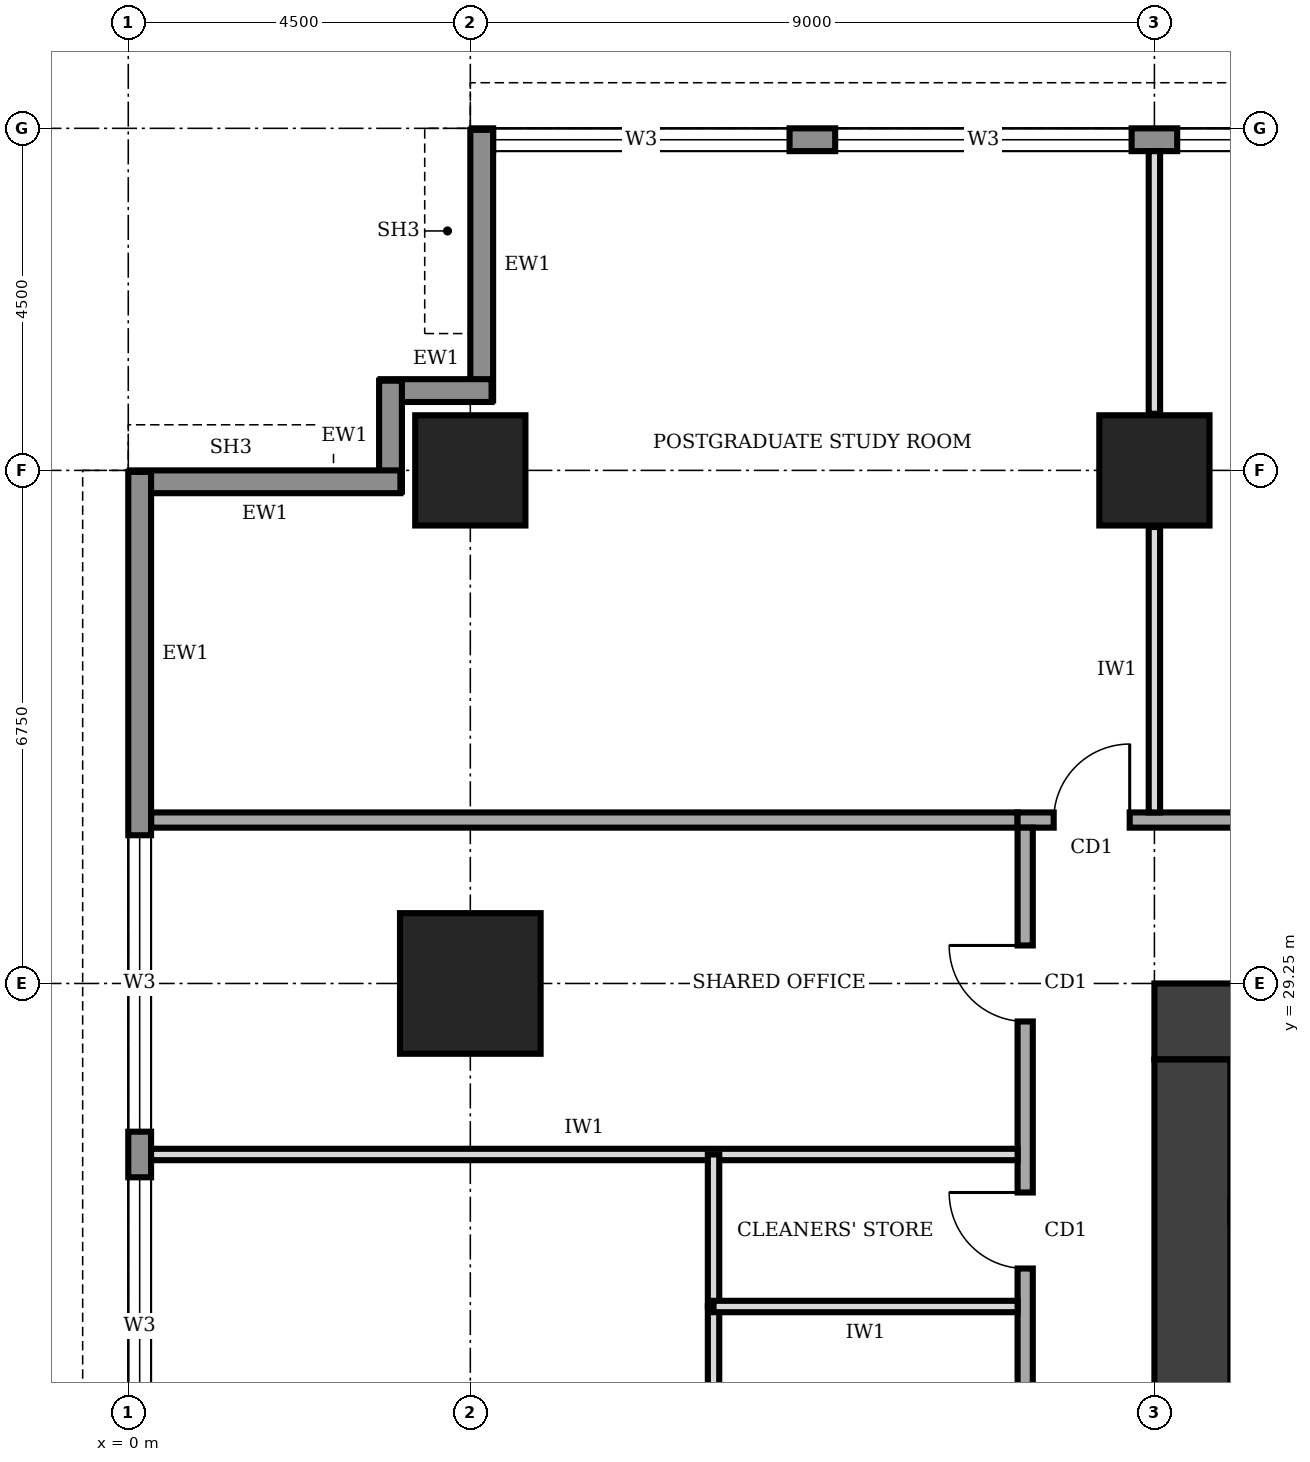
"""IFC4 building model, lengths in metres.
Left out: names, types, materials, properties, quantities, classifications, styles, units other than length and angle.
Written with IfcOpenShell. Run it as: python <this file> out.ifc"""

import sys

from ifc_helpers import new_model, si_unit, direction, frame, frame_2d, origin, origin_2d, place, context, subcontext, project, spatial, rectangle, extrude, element, fill, save


model = new_model("IFC4")
c1 = context("Model", 3, precision=1e-05, world=origin(), true_north=direction((0.0, 1.0)))
c2 = subcontext(c1, "Body", "Model", "MODEL_VIEW")
j1 = project(units=[si_unit("LENGTHUNIT", "METRE"), si_unit("PLANEANGLEUNIT", "RADIAN")], contexts=[c1])
p1 = place(None, origin())
s1 = spatial("IfcSite", under=j1, at=p1, CompositionType="ELEMENT")
p2 = place(p1, origin())
s2 = spatial("IfcBuilding", under=s1, at=p2, CompositionType="ELEMENT")
p3 = place(p2, frame((0.0, 0.0, 253.0)))
s3 = spatial("IfcBuildingStorey", under=s2, at=p3, CompositionType="ELEMENT", Elevation=253.0)
p4 = place(p3, frame((27.0, 28.75, 0.0), z_axis=(0.0, 0.0, 1.0), x_axis=(-1.0, 0.0, 0.0)))
e1 = element("IfcWall", 1, at=p4, inside=s3, PredefinedType="SHEAR", context=c2, shape_type="SweptSolid", body=[
    extrude(rectangle(XDim=13.5, YDim=1.0, at=frame_2d((6.75, 0.0))), origin(), (0.0, 0.0, 1.0), 4.0),
])
p5 = place(p4, frame((4.75, 0.0, 0.0)))
e2 = element("IfcOpeningElement", 2, at=p5, cuts=e1, PredefinedType="OPENING", context=c2, shape_type="SweptSolid", body=[
    extrude(rectangle(XDim=1.8, YDim=2.1, at=frame_2d((0.9, 1.05))), frame((0.0, 0.51, 0.0), z_axis=(0.0, -1.0, 0.0), x_axis=(1.0, 0.0, 0.0)), (0.0, 0.0, 1.0), 1.02),
])
p6 = place(p3, frame((14.0, 28.25, 0.0), z_axis=(0.0, 0.0, 1.0), x_axis=(0.0, -1.0, 0.0)))
e3 = element("IfcWall", 3, at=p6, inside=s3, PredefinedType="SHEAR", context=c2, shape_type="SweptSolid", body=[
    extrude(rectangle(XDim=16.0, YDim=1.0, at=frame_2d((8.0, 0.0))), origin(), (0.0, 0.0, 1.0), 4.0),
])
p7 = place(p3, frame((4.5, 29.25, 0.0), z_axis=(0.0, 0.0, 1.0), x_axis=(1.0, 0.0, 0.0)))
e4 = element("IfcColumn", 4, at=p7, inside=s3, PredefinedType="COLUMN", context=c2, shape_type="SweptSolid", body=[
    extrude(rectangle(XDim=1.85, YDim=1.85, at=origin_2d()), origin(), (0.0, 0.0, 1.0), 4.0),
])
for number, where, z_axis, x_axis in (
    (5, (4.5, 36.0, 0.0), (0.0, 0.0, 1.0), (1.0, 0.0, 0.0)),
    (6, (13.5, 36.0, 0.0), (0.0, 0.0, 1.0), (1.0, 0.0, 0.0)),
):
    element("IfcColumn", number, at=place(p3, frame(where, z_axis=z_axis, x_axis=x_axis)), inside=s3, PredefinedType="COLUMN", context=c2, shape_type="SweptSolid", body=[
        extrude(rectangle(XDim=1.45, YDim=1.45, at=origin_2d()), origin(), (0.0, 0.0, 1.0), 4.0),
    ])
p8 = place(p3, frame((35.98, 40.35, 0.0), z_axis=(0.0, 0.0, 1.0), x_axis=(-1.0, 0.0, 0.0)))
e7 = element("IfcWall", 7, at=p8, inside=s3, PredefinedType="STANDARD", context=c2, shape_type="SweptSolid", body=[
    extrude(rectangle(XDim=31.46, YDim=0.3, at=frame_2d((15.73, 0.0))), origin(), (0.0, 0.0, 1.0), 3.75),
])
p9 = place(p8, frame((27.28, 0.0, 0.95)))
e8 = element("IfcOpeningElement", 8, at=p9, cuts=e7, PredefinedType="OPENING", context=c2, shape_type="SweptSolid", body=[
    extrude(rectangle(XDim=3.9, YDim=1.8, at=frame_2d((1.95, 0.9))), frame((0.0, 0.16, 0.0), z_axis=(0.0, -1.0, 0.0), x_axis=(1.0, 0.0, 0.0)), (0.0, 0.0, 1.0), 0.32),
])
p10 = place(p8, frame((22.78, 0.0, 0.95)))
e9 = element("IfcOpeningElement", 9, at=p10, cuts=e7, PredefinedType="OPENING", context=c2, shape_type="SweptSolid", body=[
    extrude(rectangle(XDim=3.9, YDim=1.8, at=frame_2d((1.95, 0.9))), frame((0.0, 0.16, 0.0), z_axis=(0.0, -1.0, 0.0), x_axis=(1.0, 0.0, 0.0)), (0.0, 0.0, 1.0), 0.32),
])
p11 = place(p8, frame((18.28, 0.0, 0.95)))
e10 = element("IfcOpeningElement", 10, at=p11, cuts=e7, PredefinedType="OPENING", context=c2, shape_type="SweptSolid", body=[
    extrude(rectangle(XDim=3.9, YDim=1.8, at=frame_2d((1.95, 0.9))), frame((0.0, 0.16, 0.0), z_axis=(0.0, -1.0, 0.0), x_axis=(1.0, 0.0, 0.0)), (0.0, 0.0, 1.0), 0.32),
])
p12 = place(p8, frame((13.78, 0.0, 0.95)))
e11 = element("IfcOpeningElement", 11, at=p12, cuts=e7, PredefinedType="OPENING", context=c2, shape_type="SweptSolid", body=[
    extrude(rectangle(XDim=3.9, YDim=1.8, at=frame_2d((1.95, 0.9))), frame((0.0, 0.16, 0.0), z_axis=(0.0, -1.0, 0.0), x_axis=(1.0, 0.0, 0.0)), (0.0, 0.0, 1.0), 0.32),
])
p13 = place(p8, frame((9.28, 0.0, 0.95)))
e12 = element("IfcOpeningElement", 12, at=p13, cuts=e7, PredefinedType="OPENING", context=c2, shape_type="SweptSolid", body=[
    extrude(rectangle(XDim=3.9, YDim=1.8, at=frame_2d((1.95, 0.9))), frame((0.0, 0.16, 0.0), z_axis=(0.0, -1.0, 0.0), x_axis=(1.0, 0.0, 0.0)), (0.0, 0.0, 1.0), 0.32),
])
p14 = place(p8, frame((4.78, 0.0, 0.95)))
e13 = element("IfcOpeningElement", 13, at=p14, cuts=e7, PredefinedType="OPENING", context=c2, shape_type="SweptSolid", body=[
    extrude(rectangle(XDim=3.9, YDim=1.8, at=frame_2d((1.95, 0.9))), frame((0.0, 0.16, 0.0), z_axis=(0.0, -1.0, 0.0), x_axis=(1.0, 0.0, 0.0)), (0.0, 0.0, 1.0), 0.32),
])
p15 = place(p3, frame((4.65, 40.48, 0.0), z_axis=(0.0, 0.0, 1.0), x_axis=(0.0, -1.0, 0.0)))
e14 = element("IfcWall", 14, at=p15, inside=s3, PredefinedType="STANDARD", context=c2, shape_type="SweptSolid", body=[
    extrude(rectangle(XDim=3.56, YDim=0.3, at=frame_2d((1.78, 0.0))), origin(), (0.0, 0.0, 1.0), 2.85),
])
for number, where, z_axis, x_axis in (
    (15, (4.78, 37.05, 0.0), (0.0, 0.0, 1.0), (-1.0, 0.0, 0.0)),
    (16, (3.45, 37.18, 0.0), (0.0, 0.0, 1.0), (0.0, -1.0, 0.0)),
):
    element("IfcWall", number, at=place(p3, frame(where, z_axis=z_axis, x_axis=x_axis)), inside=s3, PredefinedType="STANDARD", context=c2, shape_type="SweptSolid", body=[
        extrude(rectangle(XDim=1.46, YDim=0.3, at=frame_2d((0.73, 0.0))), origin(), (0.0, 0.0, 1.0), 3.75),
    ])
p16 = place(p3, frame((3.58, 35.85, 0.0), z_axis=(0.0, 0.0, 1.0), x_axis=(-1.0, 0.0, 0.0)))
e17 = element("IfcWall", 17, at=p16, inside=s3, PredefinedType="STANDARD", context=c2, shape_type="SweptSolid", body=[
    extrude(rectangle(XDim=3.56, YDim=0.3, at=frame_2d((1.78, 0.0))), origin(), (0.0, 0.0, 1.0), 2.85),
])
p17 = place(p3, frame((0.15, 35.98, 0.0), z_axis=(0.0, 0.0, 1.0), x_axis=(0.0, -1.0, 0.0)))
e18 = element("IfcWall", 18, at=p17, inside=s3, PredefinedType="STANDARD", context=c2, shape_type="SweptSolid", body=[
    extrude(rectangle(XDim=31.46, YDim=0.3, at=frame_2d((15.73, 0.0))), origin(), (0.0, 0.0, 1.0), 3.75),
])
p18 = place(p17, frame((27.28, 0.0, 0.95)))
e19 = element("IfcOpeningElement", 19, at=p18, cuts=e18, PredefinedType="OPENING", context=c2, shape_type="SweptSolid", body=[
    extrude(rectangle(XDim=3.9, YDim=1.8, at=frame_2d((1.95, 0.9))), frame((0.0, 0.16, 0.0), z_axis=(0.0, -1.0, 0.0), x_axis=(1.0, 0.0, 0.0)), (0.0, 0.0, 1.0), 0.32),
])
p19 = place(p17, frame((22.78, 0.0, 0.95)))
e20 = element("IfcOpeningElement", 20, at=p19, cuts=e18, PredefinedType="OPENING", context=c2, shape_type="SweptSolid", body=[
    extrude(rectangle(XDim=3.9, YDim=1.8, at=frame_2d((1.95, 0.9))), frame((0.0, 0.16, 0.0), z_axis=(0.0, -1.0, 0.0), x_axis=(1.0, 0.0, 0.0)), (0.0, 0.0, 1.0), 0.32),
])
p20 = place(p17, frame((18.28, 0.0, 0.95)))
e21 = element("IfcOpeningElement", 21, at=p20, cuts=e18, PredefinedType="OPENING", context=c2, shape_type="SweptSolid", body=[
    extrude(rectangle(XDim=3.9, YDim=1.8, at=frame_2d((1.95, 0.9))), frame((0.0, 0.16, 0.0), z_axis=(0.0, -1.0, 0.0), x_axis=(1.0, 0.0, 0.0)), (0.0, 0.0, 1.0), 0.32),
])
p21 = place(p17, frame((13.78, 0.0, 0.95)))
e22 = element("IfcOpeningElement", 22, at=p21, cuts=e18, PredefinedType="OPENING", context=c2, shape_type="SweptSolid", body=[
    extrude(rectangle(XDim=3.9, YDim=1.8, at=frame_2d((1.95, 0.9))), frame((0.0, 0.16, 0.0), z_axis=(0.0, -1.0, 0.0), x_axis=(1.0, 0.0, 0.0)), (0.0, 0.0, 1.0), 0.32),
])
p22 = place(p17, frame((9.28, 0.0, 0.95)))
e23 = element("IfcOpeningElement", 23, at=p22, cuts=e18, PredefinedType="OPENING", context=c2, shape_type="SweptSolid", body=[
    extrude(rectangle(XDim=3.9, YDim=1.8, at=frame_2d((1.95, 0.9))), frame((0.0, 0.16, 0.0), z_axis=(0.0, -1.0, 0.0), x_axis=(1.0, 0.0, 0.0)), (0.0, 0.0, 1.0), 0.32),
])
p23 = place(p17, frame((4.78, 0.0, 0.95)))
e24 = element("IfcOpeningElement", 24, at=p23, cuts=e18, PredefinedType="OPENING", context=c2, shape_type="SweptSolid", body=[
    extrude(rectangle(XDim=3.9, YDim=1.8, at=frame_2d((1.95, 0.9))), frame((0.0, 0.16, 0.0), z_axis=(0.0, -1.0, 0.0), x_axis=(1.0, 0.0, 0.0)), (0.0, 0.0, 1.0), 0.32),
])
p24 = place(p3, frame((28.6, 31.4, 0.0), z_axis=(0.0, 0.0, 1.0), x_axis=(-1.0, 0.0, 0.0)))
e25 = element("IfcWall", 25, at=p24, inside=s3, PredefinedType="SOLIDWALL", context=c2, shape_type="SweptSolid", body=[
    extrude(rectangle(XDim=16.9, YDim=0.2, at=frame_2d((8.45, 0.0))), origin(), (0.0, 0.0, 1.0), 3.75),
])
p25 = place(p24, frame((15.425, 0.0, 0.0)))
e26 = element("IfcOpeningElement", 26, at=p25, cuts=e25, PredefinedType="OPENING", context=c2, shape_type="SweptSolid", body=[
    extrude(rectangle(XDim=1.0, YDim=2.1, at=frame_2d((0.5, 1.05))), frame((0.0, 0.11, 0.0), z_axis=(0.0, -1.0, 0.0), x_axis=(1.0, 0.0, 0.0)), (0.0, 0.0, 1.0), 0.22),
])
p26 = place(p24, frame((10.1, 0.0, 0.0)))
e27 = element("IfcOpeningElement", 27, at=p26, cuts=e25, PredefinedType="OPENING", context=c2, shape_type="SweptSolid", body=[
    extrude(rectangle(XDim=1.0, YDim=2.1, at=frame_2d((0.5, 1.05))), frame((0.0, 0.11, 0.0), z_axis=(0.0, -1.0, 0.0), x_axis=(1.0, 0.0, 0.0)), (0.0, 0.0, 1.0), 0.22),
])
p27 = place(p24, frame((2.25, 0.0, 0.0)))
e28 = element("IfcOpeningElement", 28, at=p27, cuts=e25, PredefinedType="OPENING", context=c2, shape_type="SweptSolid", body=[
    extrude(rectangle(XDim=1.4, YDim=2.1, at=frame_2d((0.7, 1.05))), frame((0.0, 0.11, 0.0), z_axis=(0.0, -1.0, 0.0), x_axis=(1.0, 0.0, 0.0)), (0.0, 0.0, 1.0), 0.22),
])
p28 = place(p3, frame((11.8, 31.3, 0.0), z_axis=(0.0, 0.0, 1.0), x_axis=(0.0, -1.0, 0.0)))
e29 = element("IfcWall", 29, at=p28, inside=s3, PredefinedType="SOLIDWALL", context=c2, shape_type="SweptSolid", body=[
    extrude(rectangle(XDim=22.3, YDim=0.2, at=frame_2d((11.15, 0.0))), origin(), (0.0, 0.0, 1.0), 3.75),
])
p29 = place(p28, frame((19.55, 0.0, 0.0)))
e30 = element("IfcOpeningElement", 30, at=p29, cuts=e29, PredefinedType="OPENING", context=c2, shape_type="SweptSolid", body=[
    extrude(rectangle(XDim=1.0, YDim=2.1, at=frame_2d((0.5, 1.05))), frame((0.0, 0.11, 0.0), z_axis=(0.0, -1.0, 0.0), x_axis=(1.0, 0.0, 0.0)), (0.0, 0.0, 1.0), 0.22),
])
p30 = place(p28, frame((15.65, 0.0, 0.0)))
e31 = element("IfcOpeningElement", 31, at=p30, cuts=e29, PredefinedType="OPENING", context=c2, shape_type="SweptSolid", body=[
    extrude(rectangle(XDim=0.9, YDim=2.1, at=frame_2d((0.45, 1.05))), frame((0.0, 0.11, 0.0), z_axis=(0.0, -1.0, 0.0), x_axis=(1.0, 0.0, 0.0)), (0.0, 0.0, 1.0), 0.22),
])
p31 = place(p28, frame((10.85, 0.0, 0.0)))
e32 = element("IfcOpeningElement", 32, at=p31, cuts=e29, PredefinedType="OPENING", context=c2, shape_type="SweptSolid", body=[
    extrude(rectangle(XDim=0.9, YDim=2.1, at=frame_2d((0.45, 1.05))), frame((0.0, 0.11, 0.0), z_axis=(0.0, -1.0, 0.0), x_axis=(1.0, 0.0, 0.0)), (0.0, 0.0, 1.0), 0.22),
])
p32 = place(p28, frame((7.8, 0.0, 0.0)))
e33 = element("IfcOpeningElement", 33, at=p32, cuts=e29, PredefinedType="OPENING", context=c2, shape_type="SweptSolid", body=[
    extrude(rectangle(XDim=0.9, YDim=2.1, at=frame_2d((0.45, 1.05))), frame((0.0, 0.11, 0.0), z_axis=(0.0, -1.0, 0.0), x_axis=(1.0, 0.0, 0.0)), (0.0, 0.0, 1.0), 0.22),
])
p33 = place(p28, frame((4.8, 0.0, 0.0)))
e34 = element("IfcOpeningElement", 34, at=p33, cuts=e29, PredefinedType="OPENING", context=c2, shape_type="SweptSolid", body=[
    extrude(rectangle(XDim=1.0, YDim=2.1, at=frame_2d((0.5, 1.05))), frame((0.0, 0.11, 0.0), z_axis=(0.0, -1.0, 0.0), x_axis=(1.0, 0.0, 0.0)), (0.0, 0.0, 1.0), 0.22),
])
p34 = place(p28, frame((12.9, 0.0, 0.0)))
e35 = element("IfcOpeningElement", 35, at=p34, cuts=e29, PredefinedType="OPENING", context=c2, shape_type="SweptSolid", body=[
    extrude(rectangle(XDim=1.0, YDim=2.1, at=frame_2d((0.5, 1.05))), frame((0.0, 0.11, 0.0), z_axis=(0.0, -1.0, 0.0), x_axis=(1.0, 0.0, 0.0)), (0.0, 0.0, 1.0), 0.22),
])
p35 = place(p28, frame((1.55, 0.0, 0.0)))
e36 = element("IfcOpeningElement", 36, at=p35, cuts=e29, PredefinedType="OPENING", context=c2, shape_type="SweptSolid", body=[
    extrude(rectangle(XDim=1.0, YDim=2.1, at=frame_2d((0.5, 1.05))), frame((0.0, 0.11, 0.0), z_axis=(0.0, -1.0, 0.0), x_axis=(1.0, 0.0, 0.0)), (0.0, 0.0, 1.0), 0.22),
])
p36 = place(p3, frame((0.3, 31.4, 0.0), z_axis=(0.0, 0.0, 1.0), x_axis=(1.0, 0.0, 0.0)))
e37 = element("IfcWall", 37, at=p36, inside=s3, PredefinedType="SOLIDWALL", context=c2, shape_type="SweptSolid", body=[
    extrude(rectangle(XDim=11.4, YDim=0.2, at=frame_2d((5.7, 0.0))), origin(), (0.0, 0.0, 1.0), 3.75),
])
p37 = place(p3, frame((13.5, 31.5, 0.0), z_axis=(0.0, 0.0, 1.0), x_axis=(0.0, 1.0, 0.0)))
e38 = element("IfcWall", 38, at=p37, inside=s3, PredefinedType="PARTITIONING", context=c2, shape_type="SweptSolid", body=[
    extrude(rectangle(XDim=3.755, YDim=0.15, at=frame_2d((1.877, 0.0))), origin(), (0.0, 0.0, 1.0), 2.85),
])
p38 = place(p3, frame((13.5, 36.745, 0.0), z_axis=(0.0, 0.0, 1.0), x_axis=(0.0, 1.0, 0.0)))
e39 = element("IfcWall", 39, at=p38, inside=s3, PredefinedType="PARTITIONING", context=c2, shape_type="SweptSolid", body=[
    extrude(rectangle(XDim=3.455, YDim=0.15, at=frame_2d((1.728, 0.0))), origin(), (0.0, 0.0, 1.0), 2.85),
])
p39 = place(p3, frame((0.3, 27.0, 0.0), z_axis=(0.0, 0.0, 1.0), x_axis=(1.0, 0.0, 0.0)))
e40 = element("IfcWall", 40, at=p39, inside=s3, PredefinedType="PARTITIONING", context=c2, shape_type="SweptSolid", body=[
    extrude(rectangle(XDim=11.4, YDim=0.15, at=frame_2d((5.7, 0.0))), origin(), (0.0, 0.0, 1.0), 3.75),
])
p40 = place(p3, frame((11.7, 25.0, 0.0), z_axis=(0.0, 0.0, 1.0), x_axis=(-1.0, 0.0, 0.0)))
e41 = element("IfcWall", 41, at=p40, inside=s3, PredefinedType="PARTITIONING", context=c2, shape_type="SweptSolid", body=[
    extrude(rectangle(XDim=4.0, YDim=0.15, at=frame_2d((2.0, 0.0))), origin(), (0.0, 0.0, 1.0), 3.75),
])
p41 = place(p3, frame((7.7, 21.1, 0.0), z_axis=(0.0, 0.0, 1.0), x_axis=(0.0, 1.0, 0.0)))
e42 = element("IfcWall", 42, at=p41, inside=s3, PredefinedType="PARTITIONING", context=c2, shape_type="SweptSolid", body=[
    extrude(rectangle(XDim=3.9, YDim=0.15, at=frame_2d((1.95, 0.0))), origin(), (0.0, 0.0, 1.0), 3.75),
])
p42 = place(p3, frame((7.7, 25.0, 0.0), z_axis=(0.0, 0.0, 1.0), x_axis=(0.0, 1.0, 0.0)))
e43 = element("IfcWall", 43, at=p42, inside=s3, PredefinedType="PARTITIONING", context=c2, shape_type="SweptSolid", body=[
    extrude(rectangle(XDim=2.0, YDim=0.15, at=frame_2d((1.0, 0.0))), origin(), (0.0, 0.0, 1.0), 3.75),
])
p43 = place(p9, origin())
e44 = element("IfcWindow", 44, at=p43, inside=s3, PartitioningType="SINGLE_PANEL", PredefinedType="WINDOW", context=c2, shape_type="SweptSolid", body=[
    extrude(rectangle(XDim=3.9, YDim=1.8, at=frame_2d((1.95, 0.9))), frame((0.0, 0.03, 0.0), z_axis=(0.0, -1.0, 0.0), x_axis=(1.0, 0.0, 0.0)), (0.0, 0.0, 1.0), 0.06),
])
fill(e8, e44)
p44 = place(p10, origin())
e45 = element("IfcWindow", 45, at=p44, inside=s3, PartitioningType="SINGLE_PANEL", PredefinedType="WINDOW", context=c2, shape_type="SweptSolid", body=[
    extrude(rectangle(XDim=3.9, YDim=1.8, at=frame_2d((1.95, 0.9))), frame((0.0, 0.03, 0.0), z_axis=(0.0, -1.0, 0.0), x_axis=(1.0, 0.0, 0.0)), (0.0, 0.0, 1.0), 0.06),
])
fill(e9, e45)
p45 = place(p11, origin())
e46 = element("IfcWindow", 46, at=p45, inside=s3, PartitioningType="SINGLE_PANEL", PredefinedType="WINDOW", context=c2, shape_type="SweptSolid", body=[
    extrude(rectangle(XDim=3.9, YDim=1.8, at=frame_2d((1.95, 0.9))), frame((0.0, 0.03, 0.0), z_axis=(0.0, -1.0, 0.0), x_axis=(1.0, 0.0, 0.0)), (0.0, 0.0, 1.0), 0.06),
])
fill(e10, e46)
p46 = place(p22, origin())
e47 = element("IfcWindow", 47, at=p46, inside=s3, PartitioningType="SINGLE_PANEL", PredefinedType="WINDOW", context=c2, shape_type="SweptSolid", body=[
    extrude(rectangle(XDim=3.9, YDim=1.8, at=frame_2d((1.95, 0.9))), frame((0.0, 0.03, 0.0), z_axis=(0.0, -1.0, 0.0), x_axis=(1.0, 0.0, 0.0)), (0.0, 0.0, 1.0), 0.06),
])
fill(e23, e47)
p47 = place(p23, origin())
e48 = element("IfcWindow", 48, at=p47, inside=s3, PartitioningType="SINGLE_PANEL", PredefinedType="WINDOW", context=c2, shape_type="SweptSolid", body=[
    extrude(rectangle(XDim=3.9, YDim=1.8, at=frame_2d((1.95, 0.9))), frame((0.0, 0.03, 0.0), z_axis=(0.0, -1.0, 0.0), x_axis=(1.0, 0.0, 0.0)), (0.0, 0.0, 1.0), 0.06),
])
fill(e24, e48)
p48 = place(p25, frame((1.0, 0.0, 0.0), z_axis=(0.0, 0.0, 1.0), x_axis=(-1.0, 0.0, 0.0)))
e49 = element("IfcDoor", 49, at=p48, inside=s3, OperationType="SINGLE_SWING_RIGHT", PredefinedType="DOOR", context=c2, shape_type="SweptSolid", body=[
    extrude(rectangle(XDim=1.0, YDim=2.1, at=frame_2d((0.5, 1.05))), frame((0.0, 0.025, 0.0), z_axis=(0.0, -1.0, 0.0), x_axis=(1.0, 0.0, 0.0)), (0.0, 0.0, 1.0), 0.05),
])
fill(e26, e49)
p49 = place(p33, frame((1.0, 0.0, 0.0), z_axis=(0.0, 0.0, 1.0), x_axis=(-1.0, 0.0, 0.0)))
e50 = element("IfcDoor", 50, at=p49, inside=s3, OperationType="SINGLE_SWING_RIGHT", PredefinedType="DOOR", context=c2, shape_type="SweptSolid", body=[
    extrude(rectangle(XDim=1.0, YDim=2.1, at=frame_2d((0.5, 1.05))), frame((0.0, 0.025, 0.0), z_axis=(0.0, -1.0, 0.0), x_axis=(1.0, 0.0, 0.0)), (0.0, 0.0, 1.0), 0.05),
])
fill(e34, e50)
p50 = place(p35, frame((1.0, 0.0, 0.0), z_axis=(0.0, 0.0, 1.0), x_axis=(-1.0, 0.0, 0.0)))
e51 = element("IfcDoor", 51, at=p50, inside=s3, OperationType="SINGLE_SWING_RIGHT", PredefinedType="DOOR", context=c2, shape_type="SweptSolid", body=[
    extrude(rectangle(XDim=1.0, YDim=2.1, at=frame_2d((0.5, 1.05))), frame((0.0, 0.025, 0.0), z_axis=(0.0, -1.0, 0.0), x_axis=(1.0, 0.0, 0.0)), (0.0, 0.0, 1.0), 0.05),
])
fill(e36, e51)
save(model, sys.argv[1])
